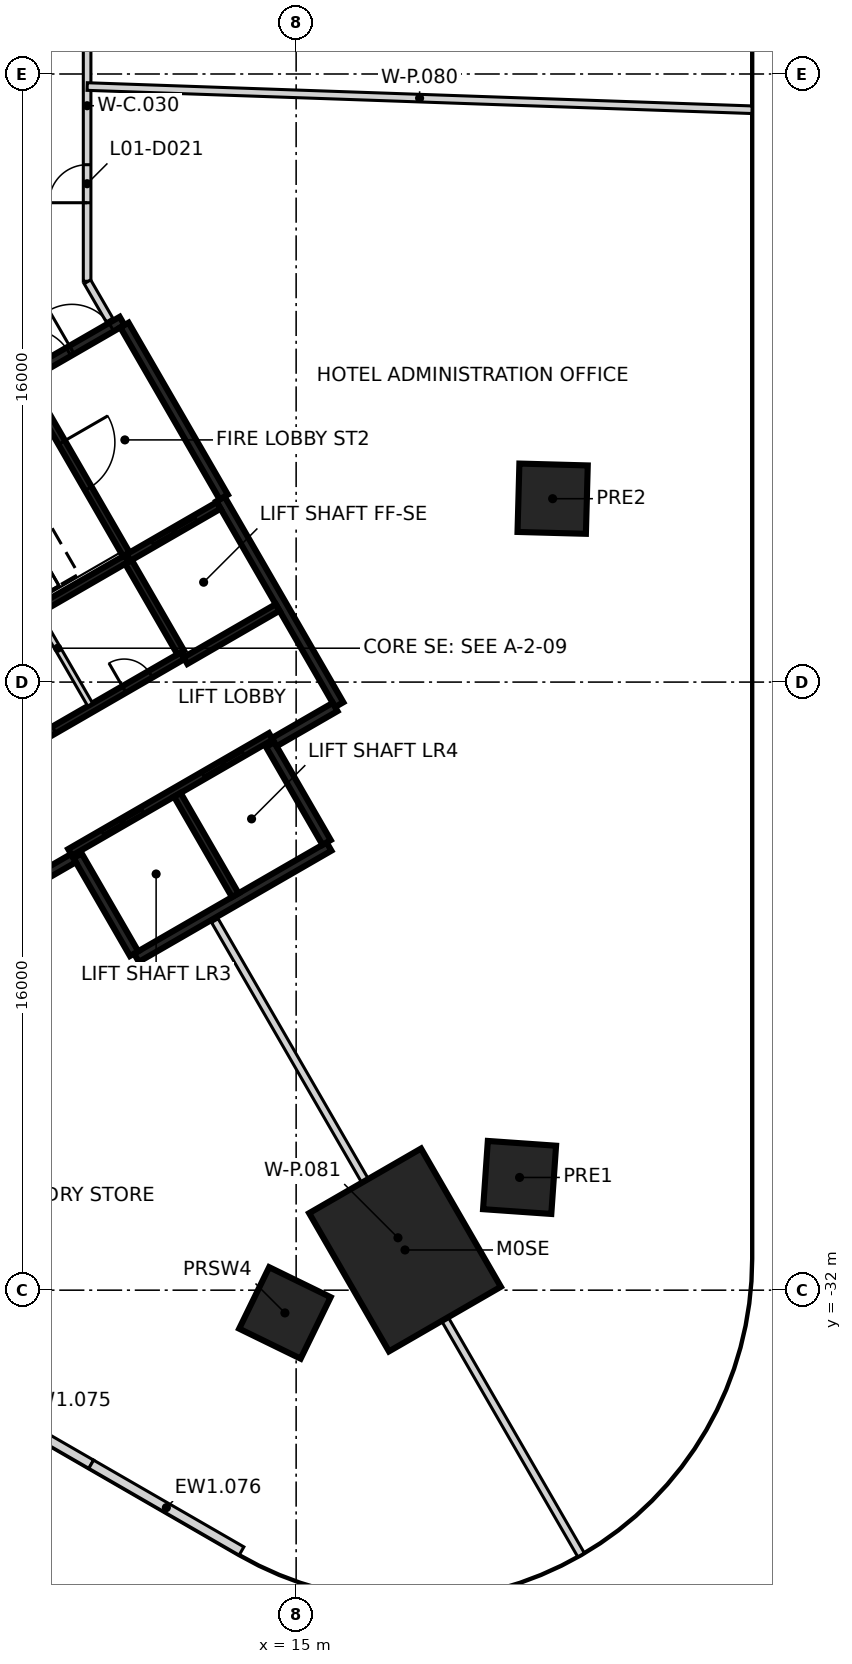
"""IFC4 building model, lengths in metres.
Left out: names, types, materials, properties, quantities, classifications, styles, units other than length and angle.
Written with IfcOpenShell. Run it as: python <this file> out.ifc"""

import sys

from ifc_helpers import new_model, si_unit, direction, frame, frame_2d, origin, origin_2d, place, context, subcontext, project, spatial, polyline, rectangle, outline, extrude, element, fill, save


model = new_model("IFC4")
c1 = context("Model", 3, precision=1e-05, world=origin(), true_north=direction((0.0, 1.0)))
c2 = subcontext(c1, "Body", "Model", "MODEL_VIEW")
j1 = project(units=[si_unit("LENGTHUNIT", "METRE"), si_unit("PLANEANGLEUNIT", "RADIAN")], contexts=[c1])
p1 = place(None, origin())
s1 = spatial("IfcSite", under=j1, at=p1, CompositionType="ELEMENT")
p2 = place(p1, origin())
s2 = spatial("IfcBuilding", under=s1, at=p2, CompositionType="ELEMENT")
p3 = place(p2, frame((0.0, 0.0, 7.5)))
s3 = spatial("IfcBuildingStorey", under=s2, at=p3, CompositionType="ELEMENT", Elevation=7.5)
p4 = place(p3, frame((17.865, -30.942, -0.4), z_axis=(0.0, 0.0, 1.0), x_axis=(-0.5, 0.866025403784, 0.0)))
e1 = element("IfcColumn", 1, at=p4, inside=s3, PredefinedType="COLUMN", context=c2, shape_type="SweptSolid", body=[
    extrude(rectangle(XDim=4.2, YDim=3.4, at=origin_2d()), origin(), (0.0, 0.0, 1.0), 6.55),
])
for number, where, z_axis, x_axis in (
    (2, (20.879, -29.034, -0.4), (0.0, 0.0, 1.0), (-0.998, 0.07, 0.0)),
    (3, (21.749, -11.174, -0.4), (0.0, 0.0, 1.0), (-1.0, 0.027, 0.0)),
    (4, (14.705, -32.599, -0.4), (0.0, 0.0, 1.0), (0.438, 0.899, 0.0)),
):
    element("IfcColumn", number, at=place(p3, frame(where, z_axis=z_axis, x_axis=x_axis)), inside=s3, PredefinedType="COLUMN", context=c2, shape_type="SweptSolid", body=[
        extrude(rectangle(XDim=1.8, YDim=1.8, at=origin_2d()), origin(), (0.0, 0.0, 1.0), 4.15),
    ])
p5 = place(p3, frame((9.608, -36.58, 0.0), z_axis=(0.0, 0.0, 1.0), x_axis=(-0.866023543838, 0.500003221507, 0.0)))
e5 = element("IfcWall", 5, at=p5, inside=s3, PredefinedType="SOLIDWALL", context=c2, shape_type="SweptSolid", body=[
    extrude(rectangle(XDim=4.566, YDim=0.25, at=frame_2d((2.283, 0.0))), origin(), (0.0, 0.0, 1.0), 6.15),
])
p6 = place(p3, frame((13.562, -38.863, 0.0), z_axis=(0.0, 0.0, 1.0), x_axis=(-0.866046694585, 0.499963121439, 0.0)))
e6 = element("IfcWall", 6, at=p6, inside=s3, PredefinedType="SOLIDWALL", context=c2, shape_type="SweptSolid", body=[
    extrude(rectangle(XDim=4.566, YDim=0.25, at=frame_2d((2.283, 0.0))), origin(), (0.0, 0.0, 1.0), 6.15),
])
p7 = place(p3, origin())
e7 = element("IfcWall", 7, at=p7, inside=s3, PredefinedType="SOLIDWALL", context=c2, shape_type="SweptSolid", body=[
    extrude(outline(polyline([(13.5, -38.971), (14.556, -39.492), (15.671, -39.87), (16.244, -40.004), (17.411, -40.158), (18.589, -40.158), (19.175, -40.1), (20.329, -39.87), (21.444, -39.492), (22.5, -38.971), (23.0, -38.66), (23.479, -38.317), (24.364, -37.541), (25.14, -36.656), (25.483, -36.177), (26.072, -35.157), (26.522, -34.07), (26.827, -32.933), (26.981, -31.766), (27.0, -31.177), (26.75, -31.169), (26.731, -31.745), (26.581, -32.884), (26.285, -33.989), (25.847, -35.047), (25.273, -36.042), (24.944, -36.5), (24.187, -37.364), (23.323, -38.121), (22.861, -38.452), (22.378, -38.752), (21.348, -39.26), (20.265, -39.628), (19.138, -39.852), (18.576, -39.908), (17.428, -39.908), (16.289, -39.758), (15.739, -39.63), (14.652, -39.26), (13.611, -38.747), (13.5, -38.971)])), origin(), (0.0, 0.0, 1.0), 6.15),
])
p8 = place(p3, frame((0.417, -12.273, 0.0), z_axis=(0.0, 0.0, 1.0), x_axis=(0.866021906294, 0.500006057782, 0.0)))
e8 = element("IfcWall", 8, at=p8, inside=s3, PredefinedType="SHEAR", context=c2, shape_type="SweptSolid", body=[
    extrude(rectangle(XDim=11.55, YDim=0.25, at=frame_2d((5.775, 0.0))), origin(), (0.0, 0.0, 1.0), 6.15),
])
p9 = place(p8, frame((10.025, 0.0, 0.0)))
e9 = element("IfcOpeningElement", 9, at=p9, cuts=e8, PredefinedType="OPENING", context=c2, shape_type="SweptSolid", body=[
    extrude(rectangle(XDim=1.2, YDim=2.1, at=frame_2d((0.6, 1.05))), frame((0.0, 0.135, 0.0), z_axis=(0.0, -1.0, 0.0), x_axis=(1.0, 0.0, 0.0)), (0.0, 0.0, 1.0), 0.27),
])
p10 = place(p8, frame((8.725, 0.0, 0.0)))
e10 = element("IfcOpeningElement", 10, at=p10, cuts=e8, PredefinedType="OPENING", context=c2, shape_type="SweptSolid", body=[
    extrude(rectangle(XDim=1.2, YDim=2.1, at=frame_2d((0.6, 1.05))), frame((0.0, 0.135, 0.0), z_axis=(0.0, -1.0, 0.0), x_axis=(1.0, 0.0, 0.0)), (0.0, 0.0, 1.0), 0.27),
])
p11 = place(p3, frame((13.008, -11.181, 0.0), z_axis=(0.0, 0.0, 1.0), x_axis=(0.500004234368, -0.866022959057, 0.0)))
e11 = element("IfcWall", 11, at=p11, inside=s3, PredefinedType="SHEAR", context=c2, shape_type="SweptSolid", body=[
    extrude(rectangle(XDim=6.25, YDim=0.25, at=frame_2d((3.125, 0.0))), origin(), (0.0, 0.0, 1.0), 6.15),
])
p12 = place(p3, frame((15.865, -20.328, 0.0), z_axis=(0.0, 0.0, 1.0), x_axis=(-0.86602852612, -0.499994591916, 0.0)))
e12 = element("IfcWall", 12, at=p12, inside=s3, PredefinedType="SHEAR", context=c2, shape_type="SweptSolid", body=[
    extrude(rectangle(XDim=5.85, YDim=0.25, at=frame_2d((2.925, 0.0))), origin(), (0.0, 0.0, 1.0), 6.15),
])
p13 = place(p3, frame((10.483, -6.606, 0.0), z_axis=(0.0, 0.0, 1.0), x_axis=(0.49999885962, -0.866026062182, 0.0)))
e13 = element("IfcWall", 13, at=p13, inside=s3, PredefinedType="SHEAR", context=c2, shape_type="SweptSolid", body=[
    extrude(rectangle(XDim=5.225, YDim=0.25, at=frame_2d((2.612, 0.0))), origin(), (0.0, 0.0, 1.0), 6.15),
])
for number, where, z_axis, x_axis in (
    (14, (14.315, -17.644, 0.0), (0.0, 0.0, 1.0), (0.5, -0.866, 0.0)),
    (15, (10.736, -23.145, 0.0), (0.0, 0.0, 1.0), (-0.5, 0.866, 0.0)),
):
    element("IfcWall", number, at=place(p3, frame(where, z_axis=z_axis, x_axis=x_axis)), inside=s3, PredefinedType="SHEAR", context=c2, shape_type="SweptSolid", body=[
        extrude(rectangle(XDim=2.974, YDim=0.25, at=frame_2d((1.487, 0.0))), origin(), (0.0, 0.0, 1.0), 6.15),
    ])
p14 = place(p3, frame((9.14, -20.631, 0.0), z_axis=(0.0, 0.0, 1.0), x_axis=(-0.866043531843, -0.499968599967, 0.0)))
e16 = element("IfcWall", 16, at=p14, inside=s3, PredefinedType="SHEAR", context=c2, shape_type="SweptSolid", body=[
    extrude(rectangle(XDim=1.975, YDim=0.25, at=frame_2d((0.987, 0.0))), origin(), (0.0, 0.0, 1.0), 6.15),
])
p15 = place(p3, frame((16.025, -16.656, 0.0), z_axis=(0.0, 0.0, 1.0), x_axis=(-0.866016279763, -0.500015802937, 0.0)))
e17 = element("IfcWall", 17, at=p15, inside=s3, PredefinedType="SHEAR", context=c2, shape_type="SweptSolid", body=[
    extrude(rectangle(XDim=1.849, YDim=0.25, at=frame_2d((0.925, 0.0))), origin(), (0.0, 0.0, 1.0), 6.15),
])
p16 = place(p3, frame((9.052, -20.48, 0.0), z_axis=(0.0, 0.0, 1.0), x_axis=(0.866030299012, 0.499991521122, 0.0)))
e18 = element("IfcWall", 18, at=p16, inside=s3, PredefinedType="SHEAR", context=c2, shape_type="SweptSolid", body=[
    extrude(rectangle(XDim=6.1, YDim=0.2, at=frame_2d((3.05, 0.0))), origin(), (0.0, 0.0, 1.0), 6.15),
])
p17 = place(p16, frame((1.0, 0.0, 0.0)))
e19 = element("IfcOpeningElement", 19, at=p17, cuts=e18, PredefinedType="OPENING", context=c2, shape_type="SweptSolid", body=[
    extrude(rectangle(XDim=1.2, YDim=2.1, at=frame_2d((0.6, 1.05))), frame((0.0, 0.11, 0.0), z_axis=(0.0, -1.0, 0.0), x_axis=(1.0, 0.0, 0.0)), (0.0, 0.0, 1.0), 0.22),
])
p18 = place(p16, frame((4.05, 0.0, 0.0)))
e20 = element("IfcOpeningElement", 20, at=p18, cuts=e18, PredefinedType="OPENING", context=c2, shape_type="SweptSolid", body=[
    extrude(rectangle(XDim=1.2, YDim=2.1, at=frame_2d((0.6, 1.05))), frame((0.0, 0.11, 0.0), z_axis=(0.0, -1.0, 0.0), x_axis=(1.0, 0.0, 0.0)), (0.0, 0.0, 1.0), 0.22),
])
p19 = place(p3, frame((10.538, -12.752, 0.0), z_axis=(0.0, 0.0, 1.0), x_axis=(-0.866038630372, -0.499977090179, 0.0)))
e21 = element("IfcWall", 21, at=p19, inside=s3, PredefinedType="SHEAR", context=c2, shape_type="SweptSolid", body=[
    extrude(rectangle(XDim=5.699, YDim=0.2, at=frame_2d((2.85, 0.0))), origin(), (0.0, 0.0, 1.0), 6.15),
])
p20 = place(p3, frame((7.077, -18.156, 0.0), z_axis=(0.0, 0.0, 1.0), x_axis=(0.866038630372, 0.499977090179, 0.0)))
e22 = element("IfcWall", 22, at=p20, inside=s3, PredefinedType="SHEAR", context=c2, shape_type="SweptSolid", body=[
    extrude(rectangle(XDim=5.699, YDim=0.2, at=frame_2d((2.85, 0.0))), origin(), (0.0, 0.0, 1.0), 6.15),
])
p21 = place(p20, frame((0.899, 0.0, 0.0)))
e23 = element("IfcOpeningElement", 23, at=p21, cuts=e22, PredefinedType="OPENING", context=c2, shape_type="SweptSolid", body=[
    extrude(rectangle(XDim=0.9, YDim=2.1, at=frame_2d((0.45, 1.05))), frame((0.0, 0.11, 0.0), z_axis=(0.0, -1.0, 0.0), x_axis=(1.0, 0.0, 0.0)), (0.0, 0.0, 1.0), 0.22),
])
p22 = place(p20, frame((3.924, 0.0, 0.0)))
e24 = element("IfcOpeningElement", 24, at=p22, cuts=e22, PredefinedType="OPENING", context=c2, shape_type="SweptSolid", body=[
    extrude(rectangle(XDim=0.8, YDim=2.1, at=frame_2d((0.4, 1.05))), frame((0.0, 0.11, 0.0), z_axis=(0.0, -1.0, 0.0), x_axis=(1.0, 0.0, 0.0)), (0.0, 0.0, 1.0), 0.22),
])
p23 = place(p3, frame((7.906, -8.094, 0.0), z_axis=(0.0, 0.0, 1.0), x_axis=(0.500024287448, -0.866011380966, 0.0)))
e25 = element("IfcWall", 25, at=p23, inside=s3, PredefinedType="SHEAR", context=c2, shape_type="SweptSolid", body=[
    extrude(rectangle(XDim=5.251, YDim=0.2, at=frame_2d((2.625, 0.0))), origin(), (0.0, 0.0, 1.0), 6.15),
])
p24 = place(p23, frame((1.849, 0.0, 0.0)))
e26 = element("IfcOpeningElement", 26, at=p24, cuts=e25, PredefinedType="OPENING", context=c2, shape_type="SweptSolid", body=[
    extrude(rectangle(XDim=1.4, YDim=2.1, at=frame_2d((0.7, 1.05))), frame((0.0, 0.11, 0.0), z_axis=(0.0, -1.0, 0.0), x_axis=(1.0, 0.0, 0.0)), (0.0, 0.0, 1.0), 0.22),
])
p25 = place(p3, frame((11.875, -18.967, 0.0), z_axis=(0.0, 0.0, 1.0), x_axis=(0.49998131003, -0.866036194175, 0.0)))
e27 = element("IfcWall", 27, at=p25, inside=s3, PredefinedType="SHEAR", context=c2, shape_type="SweptSolid", body=[
    extrude(rectangle(XDim=3.048, YDim=0.2, at=frame_2d((1.524, 0.0))), origin(), (0.0, 0.0, 1.0), 6.15),
])
p26 = place(p3, frame((11.963, -15.22, 0.0), z_axis=(0.0, 0.0, 1.0), x_axis=(-0.500034990121, 0.866005201286, 0.0)))
e28 = element("IfcWall", 28, at=p26, inside=s3, PredefinedType="SHEAR", context=c2, shape_type="SweptSolid", body=[
    extrude(rectangle(XDim=2.75, YDim=0.2, at=frame_2d((1.375, 0.0))), origin(), (0.0, 0.0, 1.0), 6.15),
])
p27 = place(p3, frame((10.587, -12.723, 0.0), z_axis=(0.0, 0.0, 1.0), x_axis=(0.866037306777, 0.499979382845, 0.0)))
e29 = element("IfcWall", 29, at=p27, inside=s3, PredefinedType="SHEAR", context=c2, shape_type="SweptSolid", body=[
    extrude(rectangle(XDim=2.742, YDim=0.2, at=frame_2d((1.371, 0.0))), origin(), (0.0, 0.0, 1.0), 6.15),
])
p28 = place(p27, frame((0.743, 0.0, 0.0)))
e30 = element("IfcOpeningElement", 30, at=p28, cuts=e29, PredefinedType="OPENING", context=c2, shape_type="SweptSolid", body=[
    extrude(rectangle(XDim=1.3, YDim=2.1, at=frame_2d((0.65, 1.05))), frame((0.0, 0.11, 0.0), z_axis=(0.0, -1.0, 0.0), x_axis=(1.0, 0.0, 0.0)), (0.0, 0.0, 1.0), 0.22),
])
p29 = place(p3, frame((14.512, -14.037, 0.0), z_axis=(0.0, 0.0, 1.0), x_axis=(-0.866044696403, -0.499966582715, 0.0)))
e31 = element("IfcWall", 31, at=p29, inside=s3, PredefinedType="SHEAR", context=c2, shape_type="SweptSolid", body=[
    extrude(rectangle(XDim=2.799, YDim=0.2, at=frame_2d((1.399, 0.0))), origin(), (0.0, 0.0, 1.0), 6.15),
])
p30 = place(p3, frame((8.207, -14.214, 0.0), z_axis=(0.0, 0.0, 1.0), x_axis=(0.50002746344, -0.86600954718, 0.0)))
e32 = element("IfcWall", 32, at=p30, inside=s3, PredefinedType="PARTITIONING", context=c2, shape_type="SweptSolid", body=[
    extrude(rectangle(XDim=2.748, YDim=0.15, at=frame_2d((1.374, 0.0))), origin(), (0.0, 0.0, 1.0), 6.15),
])
p31 = place(p3, frame((9.5, -5.454, 0.0), z_axis=(0.0, 0.0, 1.0), x_axis=(0.0, 1.0, 0.0)))
e33 = element("IfcWall", 33, at=p31, inside=s3, PredefinedType="PARTITIONING", context=c2, shape_type="SweptSolid", body=[
    extrude(rectangle(XDim=9.238, YDim=0.2, at=frame_2d((4.619, 0.0))), origin(), (0.0, 0.0, 1.0), 6.15),
])
p32 = place(p31, frame((2.067, 0.0, 0.0)))
e34 = element("IfcOpeningElement", 34, at=p32, cuts=e33, PredefinedType="OPENING", context=c2, shape_type="SweptSolid", body=[
    extrude(rectangle(XDim=1.0, YDim=2.1, at=frame_2d((0.5, 1.05))), frame((0.0, 0.11, 0.0), z_axis=(0.0, -1.0, 0.0), x_axis=(1.0, 0.0, 0.0)), (0.0, 0.0, 1.0), 0.22),
])
p33 = place(p3, frame((9.508, -5.468, 0.0), z_axis=(0.0, 0.0, 1.0), x_axis=(0.500970056897, -0.865464616315, 0.0)))
e35 = element("IfcWall", 35, at=p33, inside=s3, PredefinedType="PARTITIONING", context=c2, shape_type="SweptSolid", body=[
    extrude(rectangle(XDim=1.163, YDim=0.2, at=frame_2d((0.582, 0.0))), origin(), (0.0, 0.0, 1.0), 6.15),
])
p34 = place(p3, frame((9.502, -0.33, 0.0), z_axis=(0.0, 0.0, 1.0), x_axis=(0.999391869081, -0.034869643174, 0.0)))
e36 = element("IfcWall", 36, at=p34, inside=s3, PredefinedType="PARTITIONING", context=c2, shape_type="SweptSolid", body=[
    extrude(rectangle(XDim=17.504, YDim=0.2, at=frame_2d((8.752, 0.0))), origin(), (0.0, 0.0, 1.0), 3.75),
])
p35 = place(p3, frame((12.861, -22.276, 0.0), z_axis=(0.0, 0.0, 1.0), x_axis=(0.499989278408, -0.86603159381, 0.0)))
e37 = element("IfcWall", 37, at=p35, inside=s3, PredefinedType="PARTITIONING", context=c2, shape_type="SweptSolid", body=[
    extrude(rectangle(XDim=19.273, YDim=0.2, at=frame_2d((9.636, 0.0))), origin(), (0.0, 0.0, 1.0), 6.15),
])
p36 = place(p28, origin())
e38 = element("IfcDoor", 38, at=p36, inside=s3, OperationType="SLIDING_TO_LEFT", PredefinedType="DOOR", context=c2, shape_type="SweptSolid", body=[
    extrude(rectangle(XDim=1.3, YDim=2.1, at=frame_2d((0.65, 1.05))), frame((0.0, 0.025, 0.0), z_axis=(0.0, -1.0, 0.0), x_axis=(1.0, 0.0, 0.0)), (0.0, 0.0, 1.0), 0.05),
])
fill(e30, e38)
p37 = place(p17, origin())
e39 = element("IfcDoor", 39, at=p37, inside=s3, OperationType="DOUBLE_DOOR_SLIDING", PredefinedType="DOOR", context=c2, shape_type="SweptSolid", body=[
    extrude(rectangle(XDim=1.2, YDim=2.1, at=frame_2d((0.6, 1.05))), frame((0.0, 0.025, 0.0), z_axis=(0.0, -1.0, 0.0), x_axis=(1.0, 0.0, 0.0)), (0.0, 0.0, 1.0), 0.05),
])
fill(e19, e39)
p38 = place(p18, origin())
e40 = element("IfcDoor", 40, at=p38, inside=s3, OperationType="DOUBLE_DOOR_SLIDING", PredefinedType="DOOR", context=c2, shape_type="SweptSolid", body=[
    extrude(rectangle(XDim=1.2, YDim=2.1, at=frame_2d((0.6, 1.05))), frame((0.0, 0.025, 0.0), z_axis=(0.0, -1.0, 0.0), x_axis=(1.0, 0.0, 0.0)), (0.0, 0.0, 1.0), 0.05),
])
fill(e20, e40)
p39 = place(p9, origin())
e41 = element("IfcDoor", 41, at=p39, inside=s3, OperationType="SINGLE_SWING_LEFT", PredefinedType="DOOR", context=c2, shape_type="SweptSolid", body=[
    extrude(rectangle(XDim=1.2, YDim=2.1, at=frame_2d((0.6, 1.05))), frame((0.0, 0.025, 0.0), z_axis=(0.0, -1.0, 0.0), x_axis=(1.0, 0.0, 0.0)), (0.0, 0.0, 1.0), 0.05),
])
fill(e9, e41)
p40 = place(p10, origin())
e42 = element("IfcDoor", 42, at=p40, inside=s3, OperationType="SINGLE_SWING_RIGHT", PredefinedType="DOOR", context=c2, shape_type="SweptSolid", body=[
    extrude(rectangle(XDim=1.2, YDim=2.1, at=frame_2d((0.6, 1.05))), frame((0.0, 0.025, 0.0), z_axis=(0.0, -1.0, 0.0), x_axis=(1.0, 0.0, 0.0)), (0.0, 0.0, 1.0), 0.05),
])
fill(e10, e42)
p41 = place(p24, origin())
e43 = element("IfcDoor", 43, at=p41, inside=s3, OperationType="SINGLE_SWING_LEFT", PredefinedType="DOOR", context=c2, shape_type="SweptSolid", body=[
    extrude(rectangle(XDim=1.4, YDim=2.1, at=frame_2d((0.7, 1.05))), frame((0.0, 0.025, 0.0), z_axis=(0.0, -1.0, 0.0), x_axis=(1.0, 0.0, 0.0)), (0.0, 0.0, 1.0), 0.05),
])
fill(e26, e43)
p42 = place(p21, origin())
e44 = element("IfcDoor", 44, at=p42, inside=s3, OperationType="SINGLE_SWING_RIGHT", PredefinedType="DOOR", context=c2, shape_type="SweptSolid", body=[
    extrude(rectangle(XDim=0.9, YDim=2.1, at=frame_2d((0.45, 1.05))), frame((0.0, 0.025, 0.0), z_axis=(0.0, -1.0, 0.0), x_axis=(1.0, 0.0, 0.0)), (0.0, 0.0, 1.0), 0.05),
])
fill(e23, e44)
p43 = place(p22, origin())
e45 = element("IfcDoor", 45, at=p43, inside=s3, OperationType="SINGLE_SWING_LEFT", PredefinedType="DOOR", context=c2, shape_type="SweptSolid", body=[
    extrude(rectangle(XDim=0.8, YDim=2.1, at=frame_2d((0.4, 1.05))), frame((0.0, 0.025, 0.0), z_axis=(0.0, -1.0, 0.0), x_axis=(1.0, 0.0, 0.0)), (0.0, 0.0, 1.0), 0.05),
])
fill(e24, e45)
p44 = place(p32, frame((1.0, 0.0, 0.0), z_axis=(0.0, 0.0, 1.0), x_axis=(-1.0, 0.0, 0.0)))
e46 = element("IfcDoor", 46, at=p44, inside=s3, OperationType="SINGLE_SWING_LEFT", PredefinedType="DOOR", context=c2, shape_type="SweptSolid", body=[
    extrude(rectangle(XDim=1.0, YDim=2.1, at=frame_2d((0.5, 1.05))), frame((0.0, 0.025, 0.0), z_axis=(0.0, -1.0, 0.0), x_axis=(1.0, 0.0, 0.0)), (0.0, 0.0, 1.0), 0.05),
])
fill(e34, e46)
save(model, sys.argv[1])
